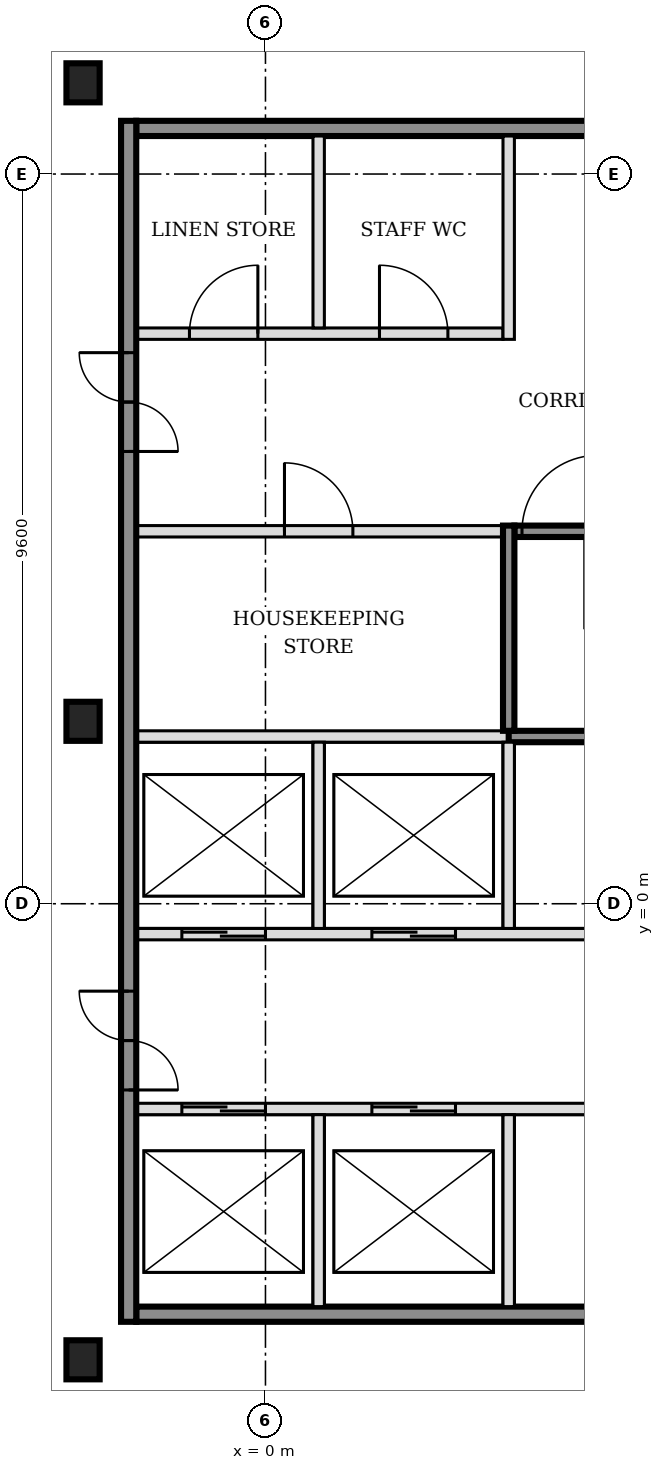
"""IFC4 building model, lengths in metres.
Left out: names, types, materials, properties, quantities, classifications, styles, units other than length and angle.
Written with IfcOpenShell. Run it as: python <this file> out.ifc"""

import sys

from ifc_helpers import new_model, si_unit, direction, frame, frame_2d, origin, origin_2d, place, context, subcontext, project, spatial, rectangle, i_section, extrude, element, fill, save


model = new_model("IFC4")
c1 = context("Model", 3, precision=1e-05, world=origin(), true_north=direction((0.0, 1.0)))
c2 = subcontext(c1, "Body", "Model", "MODEL_VIEW")
j1 = project(units=[si_unit("LENGTHUNIT", "METRE"), si_unit("PLANEANGLEUNIT", "RADIAN")], contexts=[c1])
p1 = place(None, origin())
s1 = spatial("IfcSite", under=j1, at=p1, CompositionType="ELEMENT")
p2 = place(p1, origin())
s2 = spatial("IfcBuilding", under=s1, at=p2, CompositionType="ELEMENT")
p3 = place(p2, frame((0.0, 0.0, 87.0)))
s3 = spatial("IfcBuildingStorey", under=s2, at=p3, CompositionType="ELEMENT", Elevation=87.0)
for number, where, z_axis, x_axis in (
    (1, (-2.4, -6.0, -0.15), (0.0, 0.0, 1.0), (1.0, 0.0, 0.0)),
    (2, (-2.4, 2.4, -0.15), (0.0, 0.0, 1.0), (1.0, 0.0, 0.0)),
    (3, (-2.4, 10.8, -0.15), (0.0, 0.0, 1.0), (1.0, 0.0, 0.0)),
):
    element("IfcColumn", number, at=place(p3, frame(where, z_axis=z_axis, x_axis=x_axis)), inside=s3, PredefinedType="COLUMN", context=c2, shape_type="SweptSolid", body=[
        extrude(i_section(OverallWidth=0.437, OverallDepth=0.514, WebThickness=0.061, FlangeThickness=0.097, FilletRadius=0.015, at=origin_2d()), origin(), (0.0, 0.0, 1.0), 3.6),
    ])
p4 = place(p3, frame((-1.7, -5.4, 0.0), z_axis=(0.0, 0.0, 1.0), x_axis=(1.0, 0.0, 0.0)))
e4 = element("IfcWall", 4, at=p4, inside=s3, PredefinedType="SOLIDWALL", context=c2, shape_type="SweptSolid", body=[
    extrude(rectangle(XDim=7.9, YDim=0.2, at=frame_2d((3.95, 0.0))), origin(), (0.0, 0.0, 1.0), 3.45),
])
p5 = place(p3, frame((-1.7, -2.7, 0.0), z_axis=(0.0, 0.0, 1.0), x_axis=(1.0, 0.0, 0.0)))
e5 = element("IfcWall", 5, at=p5, inside=s3, PredefinedType="SOLIDWALL", context=c2, shape_type="SweptSolid", body=[
    extrude(rectangle(XDim=7.9, YDim=0.15, at=frame_2d((3.95, 0.0))), origin(), (0.0, 0.0, 1.0), 3.45),
])
p6 = place(p5, frame((0.6, 0.0, 0.0)))
e6 = element("IfcOpeningElement", 6, at=p6, cuts=e5, PredefinedType="OPENING", context=c2, shape_type="SweptSolid", body=[
    extrude(rectangle(XDim=1.1, YDim=2.1, at=frame_2d((0.55, 1.05))), frame((0.0, 0.085, 0.0), z_axis=(0.0, -1.0, 0.0), x_axis=(1.0, 0.0, 0.0)), (0.0, 0.0, 1.0), 0.17),
])
p7 = place(p5, frame((3.1, 0.0, 0.0)))
e7 = element("IfcOpeningElement", 7, at=p7, cuts=e5, PredefinedType="OPENING", context=c2, shape_type="SweptSolid", body=[
    extrude(rectangle(XDim=1.1, YDim=2.1, at=frame_2d((0.55, 1.05))), frame((0.0, 0.085, 0.0), z_axis=(0.0, -1.0, 0.0), x_axis=(1.0, 0.0, 0.0)), (0.0, 0.0, 1.0), 0.17),
])
p8 = place(p3, frame((-1.7, -0.4, 0.0), z_axis=(0.0, 0.0, 1.0), x_axis=(1.0, 0.0, 0.0)))
e8 = element("IfcWall", 8, at=p8, inside=s3, PredefinedType="SOLIDWALL", context=c2, shape_type="SweptSolid", body=[
    extrude(rectangle(XDim=15.925, YDim=0.15, at=frame_2d((7.962, 0.0))), origin(), (0.0, 0.0, 1.0), 3.45),
])
p9 = place(p8, frame((0.6, 0.0, 0.0)))
e9 = element("IfcOpeningElement", 9, at=p9, cuts=e8, PredefinedType="OPENING", context=c2, shape_type="SweptSolid", body=[
    extrude(rectangle(XDim=1.1, YDim=2.1, at=frame_2d((0.55, 1.05))), frame((0.0, 0.085, 0.0), z_axis=(0.0, -1.0, 0.0), x_axis=(1.0, 0.0, 0.0)), (0.0, 0.0, 1.0), 0.17),
])
p10 = place(p8, frame((3.1, 0.0, 0.0)))
e10 = element("IfcOpeningElement", 10, at=p10, cuts=e8, PredefinedType="OPENING", context=c2, shape_type="SweptSolid", body=[
    extrude(rectangle(XDim=1.1, YDim=2.1, at=frame_2d((0.55, 1.05))), frame((0.0, 0.085, 0.0), z_axis=(0.0, -1.0, 0.0), x_axis=(1.0, 0.0, 0.0)), (0.0, 0.0, 1.0), 0.17),
])
p11 = place(p8, frame((11.575, 0.0, 0.0)))
e11 = element("IfcOpeningElement", 11, at=p11, cuts=e8, PredefinedType="OPENING", context=c2, shape_type="SweptSolid", body=[
    extrude(rectangle(XDim=1.2, YDim=2.1, at=frame_2d((0.6, 1.05))), frame((0.0, 0.085, 0.0), z_axis=(0.0, -1.0, 0.0), x_axis=(1.0, 0.0, 0.0)), (0.0, 0.0, 1.0), 0.17),
])
p12 = place(p8, frame((14.125, 0.0, 0.0)))
e12 = element("IfcOpeningElement", 12, at=p12, cuts=e8, PredefinedType="OPENING", context=c2, shape_type="SweptSolid", body=[
    extrude(rectangle(XDim=1.2, YDim=2.1, at=frame_2d((0.6, 1.05))), frame((0.0, 0.085, 0.0), z_axis=(0.0, -1.0, 0.0), x_axis=(1.0, 0.0, 0.0)), (0.0, 0.0, 1.0), 0.17),
])
p13 = place(p3, frame((-1.7, 2.2, 0.0), z_axis=(0.0, 0.0, 1.0), x_axis=(1.0, 0.0, 0.0)))
e13 = element("IfcWall", 13, at=p13, inside=s3, PredefinedType="SOLIDWALL", context=c2, shape_type="SweptSolid", body=[
    extrude(rectangle(XDim=4.9, YDim=0.15, at=frame_2d((2.45, 0.0))), origin(), (0.0, 0.0, 1.0), 3.45),
])
p14 = place(p3, frame((3.2, 2.2, 0.0), z_axis=(0.0, 0.0, 1.0), x_axis=(1.0, 0.0, 0.0)))
e14 = element("IfcWall", 14, at=p14, inside=s3, PredefinedType="SOLIDWALL", context=c2, shape_type="SweptSolid", body=[
    extrude(rectangle(XDim=6.5, YDim=0.15, at=frame_2d((3.25, 0.0))), origin(), (0.0, 0.0, 1.0), 3.45),
])
p15 = place(p3, frame((-1.7, 4.9, 0.0), z_axis=(0.0, 0.0, 1.0), x_axis=(1.0, 0.0, 0.0)))
e15 = element("IfcWall", 15, at=p15, inside=s3, PredefinedType="PARTITIONING", context=c2, shape_type="SweptSolid", body=[
    extrude(rectangle(XDim=4.825, YDim=0.15, at=frame_2d((2.413, 0.0))), origin(), (0.0, 0.0, 1.0), 3.45),
])
p16 = place(p15, frame((1.95, 0.0, 0.0)))
e16 = element("IfcOpeningElement", 16, at=p16, cuts=e15, PredefinedType="OPENING", context=c2, shape_type="SweptSolid", body=[
    extrude(rectangle(XDim=0.9, YDim=2.1, at=frame_2d((0.45, 1.05))), frame((0.0, 0.085, 0.0), z_axis=(0.0, -1.0, 0.0), x_axis=(1.0, 0.0, 0.0)), (0.0, 0.0, 1.0), 0.17),
])
p17 = place(p3, frame((3.275, 4.9, 0.0), z_axis=(0.0, 0.0, 1.0), x_axis=(1.0, 0.0, 0.0)))
e17 = element("IfcWall", 17, at=p17, inside=s3, PredefinedType="SOLIDWALL", context=c2, shape_type="SweptSolid", body=[
    extrude(rectangle(XDim=6.425, YDim=0.15, at=frame_2d((3.212, 0.0))), origin(), (0.0, 0.0, 1.0), 3.45),
])
p18 = place(p17, frame((0.1, 0.0, 0.0)))
e18 = element("IfcOpeningElement", 18, at=p18, cuts=e17, PredefinedType="OPENING", context=c2, shape_type="SweptSolid", body=[
    extrude(rectangle(XDim=1.0, YDim=2.1, at=frame_2d((0.5, 1.05))), frame((0.0, 0.085, 0.0), z_axis=(0.0, -1.0, 0.0), x_axis=(1.0, 0.0, 0.0)), (0.0, 0.0, 1.0), 0.17),
])
p19 = place(p3, frame((-1.7, 7.5, 0.0), z_axis=(0.0, 0.0, 1.0), x_axis=(1.0, 0.0, 0.0)))
e19 = element("IfcWall", 19, at=p19, inside=s3, PredefinedType="PARTITIONING", context=c2, shape_type="SweptSolid", body=[
    extrude(rectangle(XDim=4.825, YDim=0.15, at=frame_2d((2.413, 0.0))), origin(), (0.0, 0.0, 1.0), 3.45),
])
p20 = place(p19, frame((0.7, 0.0, 0.0)))
e20 = element("IfcOpeningElement", 20, at=p20, cuts=e19, PredefinedType="OPENING", context=c2, shape_type="SweptSolid", body=[
    extrude(rectangle(XDim=0.9, YDim=2.1, at=frame_2d((0.45, 1.05))), frame((0.0, 0.085, 0.0), z_axis=(0.0, -1.0, 0.0), x_axis=(1.0, 0.0, 0.0)), (0.0, 0.0, 1.0), 0.17),
])
p21 = place(p19, frame((3.2, 0.0, 0.0)))
e21 = element("IfcOpeningElement", 21, at=p21, cuts=e19, PredefinedType="OPENING", context=c2, shape_type="SweptSolid", body=[
    extrude(rectangle(XDim=0.9, YDim=2.1, at=frame_2d((0.45, 1.05))), frame((0.0, 0.085, 0.0), z_axis=(0.0, -1.0, 0.0), x_axis=(1.0, 0.0, 0.0)), (0.0, 0.0, 1.0), 0.17),
])
p22 = place(p3, frame((-1.7, 10.2, 0.0), z_axis=(0.0, 0.0, 1.0), x_axis=(1.0, 0.0, 0.0)))
e22 = element("IfcWall", 22, at=p22, inside=s3, PredefinedType="SOLIDWALL", context=c2, shape_type="SweptSolid", body=[
    extrude(rectangle(XDim=7.9, YDim=0.2, at=frame_2d((3.95, 0.0))), origin(), (0.0, 0.0, 1.0), 3.45),
])
p23 = place(p3, frame((-1.8, -5.5, 0.0), z_axis=(0.0, 0.0, 1.0), x_axis=(0.0, 1.0, 0.0)))
e23 = element("IfcWall", 23, at=p23, inside=s3, PredefinedType="SOLIDWALL", context=c2, shape_type="SweptSolid", body=[
    extrude(rectangle(XDim=15.8, YDim=0.2, at=frame_2d((7.9, 0.0))), origin(), (0.0, 0.0, 1.0), 3.45),
])
p24 = place(p23, frame((3.05, 0.0, 0.0)))
e24 = element("IfcOpeningElement", 24, at=p24, cuts=e23, PredefinedType="OPENING", context=c2, shape_type="SweptSolid", body=[
    extrude(rectangle(XDim=1.3, YDim=2.1, at=frame_2d((0.65, 1.05))), frame((0.0, 0.11, 0.0), z_axis=(0.0, -1.0, 0.0), x_axis=(1.0, 0.0, 0.0)), (0.0, 0.0, 1.0), 0.22),
])
p25 = place(p23, frame((11.45, 0.0, 0.0)))
e25 = element("IfcOpeningElement", 25, at=p25, cuts=e23, PredefinedType="OPENING", context=c2, shape_type="SweptSolid", body=[
    extrude(rectangle(XDim=1.3, YDim=2.1, at=frame_2d((0.65, 1.05))), frame((0.0, 0.11, 0.0), z_axis=(0.0, -1.0, 0.0), x_axis=(1.0, 0.0, 0.0)), (0.0, 0.0, 1.0), 0.22),
])
p26 = place(p3, frame((0.7, -5.3, 0.0), z_axis=(0.0, 0.0, 1.0), x_axis=(0.0, 1.0, 0.0)))
e26 = element("IfcWall", 26, at=p26, inside=s3, PredefinedType="SOLIDWALL", context=c2, shape_type="SweptSolid", body=[
    extrude(rectangle(XDim=2.525, YDim=0.15, at=frame_2d((1.263, 0.0))), origin(), (0.0, 0.0, 1.0), 3.45),
])
p27 = place(p3, frame((0.7, -0.325, 0.0), z_axis=(0.0, 0.0, 1.0), x_axis=(0.0, 1.0, 0.0)))
e27 = element("IfcWall", 27, at=p27, inside=s3, PredefinedType="SOLIDWALL", context=c2, shape_type="SweptSolid", body=[
    extrude(rectangle(XDim=2.45, YDim=0.15, at=frame_2d((1.225, 0.0))), origin(), (0.0, 0.0, 1.0), 3.45),
])
p28 = place(p3, frame((0.7, 7.575, 0.0), z_axis=(0.0, 0.0, 1.0), x_axis=(0.0, 1.0, 0.0)))
e28 = element("IfcWall", 28, at=p28, inside=s3, PredefinedType="PARTITIONING", context=c2, shape_type="SweptSolid", body=[
    extrude(rectangle(XDim=2.525, YDim=0.15, at=frame_2d((1.263, 0.0))), origin(), (0.0, 0.0, 1.0), 3.45),
])
p29 = place(p3, frame((3.2, -5.3, 0.0), z_axis=(0.0, 0.0, 1.0), x_axis=(0.0, 1.0, 0.0)))
e29 = element("IfcWall", 29, at=p29, inside=s3, PredefinedType="SOLIDWALL", context=c2, shape_type="SweptSolid", body=[
    extrude(rectangle(XDim=2.525, YDim=0.15, at=frame_2d((1.263, 0.0))), origin(), (0.0, 0.0, 1.0), 3.45),
])
p30 = place(p3, frame((3.2, -0.325, 0.0), z_axis=(0.0, 0.0, 1.0), x_axis=(0.0, 1.0, 0.0)))
e30 = element("IfcWall", 30, at=p30, inside=s3, PredefinedType="SOLIDWALL", context=c2, shape_type="SweptSolid", body=[
    extrude(rectangle(XDim=2.45, YDim=0.15, at=frame_2d((1.225, 0.0))), origin(), (0.0, 0.0, 1.0), 3.45),
])
p31 = place(p3, frame((3.2, 2.275, 0.0), z_axis=(0.0, 0.0, 1.0), x_axis=(0.0, 1.0, 0.0)))
e31 = element("IfcWall", 31, at=p31, inside=s3, PredefinedType="SOLIDWALL", context=c2, shape_type="SweptSolid", body=[
    extrude(rectangle(XDim=2.7, YDim=0.15, at=frame_2d((1.35, 0.0))), origin(), (0.0, 0.0, 1.0), 3.45),
])
p32 = place(p3, frame((3.2, 7.425, 0.0), z_axis=(0.0, 0.0, 1.0), x_axis=(0.0, 1.0, 0.0)))
e32 = element("IfcWall", 32, at=p32, inside=s3, PredefinedType="PARTITIONING", context=c2, shape_type="SweptSolid", body=[
    extrude(rectangle(XDim=2.675, YDim=0.15, at=frame_2d((1.337, 0.0))), origin(), (0.0, 0.0, 1.0), 3.45),
])
p33 = place(p6, origin())
e33 = element("IfcDoor", 33, at=p33, inside=s3, OperationType="DOUBLE_DOOR_SLIDING", PredefinedType="DOOR", context=c2, shape_type="SweptSolid", body=[
    extrude(rectangle(XDim=1.1, YDim=2.1, at=frame_2d((0.55, 1.05))), frame((0.0, 0.025, 0.0), z_axis=(0.0, -1.0, 0.0), x_axis=(1.0, 0.0, 0.0)), (0.0, 0.0, 1.0), 0.05),
])
fill(e6, e33)
p34 = place(p7, origin())
e34 = element("IfcDoor", 34, at=p34, inside=s3, OperationType="DOUBLE_DOOR_SLIDING", PredefinedType="DOOR", context=c2, shape_type="SweptSolid", body=[
    extrude(rectangle(XDim=1.1, YDim=2.1, at=frame_2d((0.55, 1.05))), frame((0.0, 0.025, 0.0), z_axis=(0.0, -1.0, 0.0), x_axis=(1.0, 0.0, 0.0)), (0.0, 0.0, 1.0), 0.05),
])
fill(e7, e34)
p35 = place(p9, origin())
e35 = element("IfcDoor", 35, at=p35, inside=s3, OperationType="DOUBLE_DOOR_SLIDING", PredefinedType="DOOR", context=c2, shape_type="SweptSolid", body=[
    extrude(rectangle(XDim=1.1, YDim=2.1, at=frame_2d((0.55, 1.05))), frame((0.0, 0.025, 0.0), z_axis=(0.0, -1.0, 0.0), x_axis=(1.0, 0.0, 0.0)), (0.0, 0.0, 1.0), 0.05),
])
fill(e9, e35)
p36 = place(p10, origin())
e36 = element("IfcDoor", 36, at=p36, inside=s3, OperationType="DOUBLE_DOOR_SLIDING", PredefinedType="DOOR", context=c2, shape_type="SweptSolid", body=[
    extrude(rectangle(XDim=1.1, YDim=2.1, at=frame_2d((0.55, 1.05))), frame((0.0, 0.025, 0.0), z_axis=(0.0, -1.0, 0.0), x_axis=(1.0, 0.0, 0.0)), (0.0, 0.0, 1.0), 0.05),
])
fill(e10, e36)
p37 = place(p18, origin())
e37 = element("IfcDoor", 37, at=p37, inside=s3, OperationType="SINGLE_SWING_RIGHT", PredefinedType="DOOR", context=c2, shape_type="SweptSolid", body=[
    extrude(rectangle(XDim=1.0, YDim=2.1, at=frame_2d((0.5, 1.05))), frame((0.0, 0.025, 0.0), z_axis=(0.0, -1.0, 0.0), x_axis=(1.0, 0.0, 0.0)), (0.0, 0.0, 1.0), 0.05),
])
fill(e18, e37)
p38 = place(p24, origin())
e38 = element("IfcDoor", 38, at=p38, inside=s3, OperationType="DOUBLE_DOOR_SINGLE_SWING", PredefinedType="DOOR", context=c2, shape_type="SweptSolid", body=[
    extrude(rectangle(XDim=1.3, YDim=2.1, at=frame_2d((0.65, 1.05))), frame((0.0, 0.025, 0.0), z_axis=(0.0, -1.0, 0.0), x_axis=(1.0, 0.0, 0.0)), (0.0, 0.0, 1.0), 0.05),
])
fill(e24, e38)
p39 = place(p25, origin())
e39 = element("IfcDoor", 39, at=p39, inside=s3, OperationType="DOUBLE_DOOR_SINGLE_SWING", PredefinedType="DOOR", context=c2, shape_type="SweptSolid", body=[
    extrude(rectangle(XDim=1.3, YDim=2.1, at=frame_2d((0.65, 1.05))), frame((0.0, 0.025, 0.0), z_axis=(0.0, -1.0, 0.0), x_axis=(1.0, 0.0, 0.0)), (0.0, 0.0, 1.0), 0.05),
])
fill(e25, e39)
p40 = place(p16, origin())
e40 = element("IfcDoor", 40, at=p40, inside=s3, OperationType="SINGLE_SWING_LEFT", PredefinedType="DOOR", context=c2, shape_type="SweptSolid", body=[
    extrude(rectangle(XDim=0.9, YDim=2.1, at=frame_2d((0.45, 1.05))), frame((0.0, 0.025, 0.0), z_axis=(0.0, -1.0, 0.0), x_axis=(1.0, 0.0, 0.0)), (0.0, 0.0, 1.0), 0.05),
])
fill(e16, e40)
p41 = place(p20, origin())
e41 = element("IfcDoor", 41, at=p41, inside=s3, OperationType="SINGLE_SWING_RIGHT", PredefinedType="DOOR", context=c2, shape_type="SweptSolid", body=[
    extrude(rectangle(XDim=0.9, YDim=2.1, at=frame_2d((0.45, 1.05))), frame((0.0, 0.025, 0.0), z_axis=(0.0, -1.0, 0.0), x_axis=(1.0, 0.0, 0.0)), (0.0, 0.0, 1.0), 0.05),
])
fill(e20, e41)
p42 = place(p21, origin())
e42 = element("IfcDoor", 42, at=p42, inside=s3, OperationType="SINGLE_SWING_LEFT", PredefinedType="DOOR", context=c2, shape_type="SweptSolid", body=[
    extrude(rectangle(XDim=0.9, YDim=2.1, at=frame_2d((0.45, 1.05))), frame((0.0, 0.025, 0.0), z_axis=(0.0, -1.0, 0.0), x_axis=(1.0, 0.0, 0.0)), (0.0, 0.0, 1.0), 0.05),
])
fill(e21, e42)
save(model, sys.argv[1])
